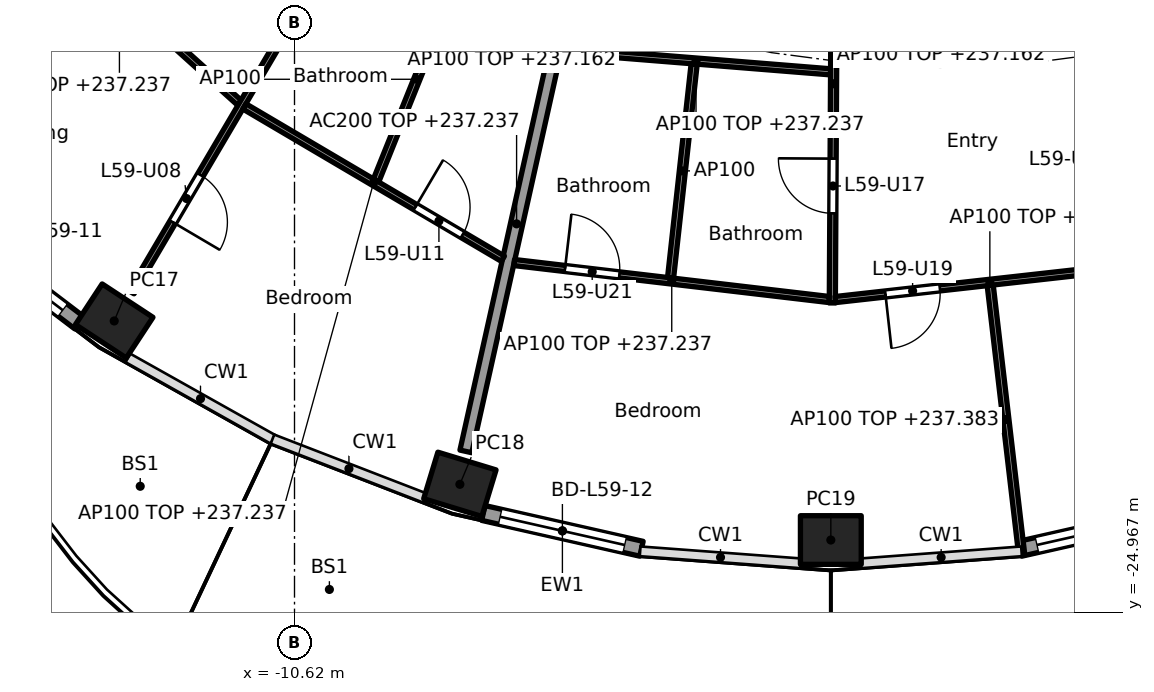
"""IFC4 building model, lengths in metres.
Left out: names, types, materials, properties, quantities, classifications, styles, units other than length and angle.
Written with IfcOpenShell. Run it as: python <this file> out.ifc"""

import sys

from ifc_helpers import new_model, si_unit, direction, frame, frame_2d, origin, origin_2d, place, context, subcontext, project, spatial, rectangle, hollow_rectangle, extrude, element, fill, save


model = new_model("IFC4")
c1 = context("Model", 3, precision=1e-05, world=origin(), true_north=direction((0.0, 1.0)))
c2 = subcontext(c1, "Body", "Model", "MODEL_VIEW")
j1 = project(units=[si_unit("LENGTHUNIT", "METRE"), si_unit("PLANEANGLEUNIT", "RADIAN")], contexts=[c1])
p1 = place(None, origin())
s1 = spatial("IfcSite", under=j1, at=p1, CompositionType="ELEMENT")
p2 = place(p1, origin())
s2 = spatial("IfcBuilding", under=s1, at=p2, CompositionType="ELEMENT")
p3 = place(p2, frame((0.0, 0.0, 234.4)))
s3 = spatial("IfcBuildingStorey", under=s2, at=p3, CompositionType="ELEMENT", Elevation=234.4)
for number, where, z_axis, x_axis in (
    (1, (-13.585, -20.17, 0.0), (0.0, 0.0, 1.0), (0.836, -0.549, 0.0)),
    (2, (-7.9, -22.856, 0.0), (0.0, 0.0, 1.0), (0.957, -0.292, 0.0)),
    (3, (-1.8, -23.772, 0.0), (0.0, 0.0, 1.0), (1.0, 0.0, 0.0)),
):
    element("IfcColumn", number, at=place(p3, frame(where, z_axis=z_axis, x_axis=x_axis)), inside=s3, PredefinedType="COLUMN", context=c2, shape_type="SweptSolid", body=[
        extrude(hollow_rectangle(XDim=1.0, YDim=0.8, WallThickness=0.032, at=origin_2d()), origin(), (0.0, 0.0, 1.0), 3.7),
    ])
p4 = place(p3, frame((-14.157, -20.201, 0.0), z_axis=(0.0, 0.0, 1.0), x_axis=(-0.795990084031, 0.60530966135, 0.0)))
e4 = element("IfcWall", 4, at=p4, inside=s3, PredefinedType="SOLIDWALL", context=c2, shape_type="SweptSolid", body=[
    extrude(rectangle(XDim=2.789, YDim=0.25, at=frame_2d((1.394, 0.0))), origin(), (0.0, 0.0, 1.0), 3.44),
])
p5 = place(p4, frame((0.344, 0.0, 0.0)))
e5 = element("IfcOpeningElement", 5, at=p5, cuts=e4, PredefinedType="OPENING", context=c2, shape_type="SweptSolid", body=[
    extrude(rectangle(XDim=2.1, YDim=2.4, at=frame_2d((1.05, 1.2))), frame((0.0, 0.135, 0.0), z_axis=(0.0, -1.0, 0.0), x_axis=(1.0, 0.0, 0.0)), (0.0, 0.0, 1.0), 0.27),
])
p6 = place(p3, frame((-4.914, -23.916, 0.0), z_axis=(0.0, 0.0, 1.0), x_axis=(-0.975324089124, 0.220777990694, 0.0)))
e6 = element("IfcWall", 6, at=p6, inside=s3, PredefinedType="SOLIDWALL", context=c2, shape_type="SweptSolid", body=[
    extrude(rectangle(XDim=2.666, YDim=0.25, at=frame_2d((1.333, 0.0))), origin(), (0.0, 0.0, 1.0), 3.44),
])
p7 = place(p6, frame((0.283, 0.0, 0.0)))
e7 = element("IfcOpeningElement", 7, at=p7, cuts=e6, PredefinedType="OPENING", context=c2, shape_type="SweptSolid", body=[
    extrude(rectangle(XDim=2.1, YDim=2.4, at=frame_2d((1.05, 1.2))), frame((0.0, 0.135, 0.0), z_axis=(0.0, -1.0, 0.0), x_axis=(1.0, 0.0, 0.0)), (0.0, 0.0, 1.0), 0.27),
])
p8 = place(p3, frame((3.915, -23.327, 0.0), z_axis=(0.0, 0.0, 1.0), x_axis=(-0.975324089124, -0.220777990694, 0.0)))
e8 = element("IfcWall", 8, at=p8, inside=s3, PredefinedType="SOLIDWALL", context=c2, shape_type="SweptSolid", body=[
    extrude(rectangle(XDim=2.666, YDim=0.25, at=frame_2d((1.333, 0.0))), origin(), (0.0, 0.0, 1.0), 3.44),
])
p9 = place(p8, frame((0.283, 0.0, 0.0)))
e9 = element("IfcOpeningElement", 9, at=p9, cuts=e8, PredefinedType="OPENING", context=c2, shape_type="SweptSolid", body=[
    extrude(rectangle(XDim=2.1, YDim=2.4, at=frame_2d((1.05, 1.2))), frame((0.0, 0.135, 0.0), z_axis=(0.0, -1.0, 0.0), x_axis=(1.0, 0.0, 0.0)), (0.0, 0.0, 1.0), 0.27),
])
p10 = place(p3, frame((-6.134, -14.831, 0.0), z_axis=(0.0, 0.0, 1.0), x_axis=(-0.217500172543, -0.976060282433, 0.0)))
e10 = element("IfcWall", 10, at=p10, inside=s3, PredefinedType="PARTITIONING", context=c2, shape_type="SweptSolid", body=[
    extrude(rectangle(XDim=7.668, YDim=0.2, at=frame_2d((3.834, 0.0))), origin(), (0.0, 0.0, 1.0), 2.837),
])
p11 = place(p3, frame((-15.474, -13.019, 0.0), z_axis=(0.0, 0.0, 1.0), x_axis=(0.742348572616, -0.670013878017, 0.0)))
e11 = element("IfcWall", 11, at=p11, inside=s3, PredefinedType="PARTITIONING", context=c2, shape_type="SweptSolid", body=[
    extrude(rectangle(XDim=5.319, YDim=0.1, at=frame_2d((2.66, 0.0))), origin(), (0.0, 0.0, 1.0), 2.837),
])
p12 = place(p11, frame((2.21, 0.0, 0.0)))
e12 = element("IfcOpeningElement", 12, at=p12, cuts=e11, PredefinedType="OPENING", context=c2, shape_type="SweptSolid", body=[
    extrude(rectangle(XDim=0.9, YDim=2.1, at=frame_2d((0.45, 1.05))), frame((0.0, 0.06, 0.0), z_axis=(0.0, -1.0, 0.0), x_axis=(1.0, 0.0, 0.0)), (0.0, 0.0, 1.0), 0.12),
])
p13 = place(p3, frame((-7.709, -10.198, 0.0), z_axis=(0.0, 0.0, 1.0), x_axis=(-0.507355901053, -0.8617366127, 0.0)))
e13 = element("IfcWall", 13, at=p13, inside=s3, PredefinedType="PARTITIONING", context=c2, shape_type="SweptSolid", body=[
    extrude(rectangle(XDim=11.025, YDim=0.1, at=frame_2d((5.512, 0.0))), origin(), (0.0, 0.0, 1.0), 2.762),
])
p14 = place(p13, frame((1.326, 0.0, 0.0)))
e14 = element("IfcOpeningElement", 14, at=p14, cuts=e13, PredefinedType="OPENING", context=c2, shape_type="SweptSolid", body=[
    extrude(rectangle(XDim=0.9, YDim=2.1, at=frame_2d((0.45, 1.05))), frame((0.0, 0.06, 0.0), z_axis=(0.0, -1.0, 0.0), x_axis=(1.0, 0.0, 0.0)), (0.0, 0.0, 1.0), 0.12),
])
p15 = place(p13, frame((5.05, 0.0, 0.0)))
e15 = element("IfcOpeningElement", 15, at=p15, cuts=e13, PredefinedType="OPENING", context=c2, shape_type="SweptSolid", body=[
    extrude(rectangle(XDim=0.9, YDim=2.1, at=frame_2d((0.45, 1.05))), frame((0.0, 0.06, 0.0), z_axis=(0.0, -1.0, 0.0), x_axis=(1.0, 0.0, 0.0)), (0.0, 0.0, 1.0), 0.12),
])
p16 = place(p13, frame((8.787, 0.0, 0.0)))
e16 = element("IfcOpeningElement", 16, at=p16, cuts=e13, PredefinedType="OPENING", context=c2, shape_type="SweptSolid", body=[
    extrude(rectangle(XDim=0.9, YDim=2.1, at=frame_2d((0.45, 1.05))), frame((0.0, 0.06, 0.0), z_axis=(0.0, -1.0, 0.0), x_axis=(1.0, 0.0, 0.0)), (0.0, 0.0, 1.0), 0.12),
])
p17 = place(p3, frame((-11.445, -16.641, 0.0), z_axis=(0.0, 0.0, 1.0), x_axis=(0.861568986754, -0.507640503766, 0.0)))
e17 = element("IfcWall", 17, at=p17, inside=s3, PredefinedType="PARTITIONING", context=c2, shape_type="SweptSolid", body=[
    extrude(rectangle(XDim=4.935, YDim=0.1, at=frame_2d((2.467, 0.0))), origin(), (0.0, 0.0, 1.0), 2.837),
])
p18 = place(p17, frame((3.264, 0.0, 0.0)))
e18 = element("IfcOpeningElement", 18, at=p18, cuts=e17, PredefinedType="OPENING", context=c2, shape_type="SweptSolid", body=[
    extrude(rectangle(XDim=0.9, YDim=2.1, at=frame_2d((0.45, 1.05))), frame((0.0, 0.06, 0.0), z_axis=(0.0, -1.0, 0.0), x_axis=(1.0, 0.0, 0.0)), (0.0, 0.0, 1.0), 0.12),
])
p19 = place(p3, frame((-7.939, -14.531, 0.0), z_axis=(0.0, 0.0, 1.0), x_axis=(-0.373254758443, -0.927728885666, 0.0)))
e19 = element("IfcWall", 19, at=p19, inside=s3, PredefinedType="PARTITIONING", context=c2, shape_type="SweptSolid", body=[
    extrude(rectangle(XDim=3.589, YDim=0.1, at=frame_2d((1.794, 0.0))), origin(), (0.0, 0.0, 1.0), 3.44),
])
p20 = place(p3, frame((-6.23, -15.717, 0.0), z_axis=(0.0, 0.0, 1.0), x_axis=(0.996785662802, -0.080114558181, 0.0)))
e20 = element("IfcWall", 20, at=p20, inside=s3, PredefinedType="PARTITIONING", context=c2, shape_type="SweptSolid", body=[
    extrude(rectangle(XDim=4.44, YDim=0.1, at=frame_2d((2.22, 0.0))), origin(), (0.0, 0.0, 1.0), 2.837),
])
p21 = place(p3, frame((-7.008, -19.209, 0.0), z_axis=(0.0, 0.0, 1.0), x_axis=(0.993174535364, -0.116637653885, 0.0)))
e21 = element("IfcWall", 21, at=p21, inside=s3, PredefinedType="PARTITIONING", context=c2, shape_type="SweptSolid", body=[
    extrude(rectangle(XDim=5.218, YDim=0.1, at=frame_2d((2.609, 0.0))), origin(), (0.0, 0.0, 1.0), 2.837),
])
p22 = place(p21, frame((0.842, 0.0, 0.0)))
e22 = element("IfcOpeningElement", 22, at=p22, cuts=e21, PredefinedType="OPENING", context=c2, shape_type="SweptSolid", body=[
    extrude(rectangle(XDim=0.9, YDim=2.1, at=frame_2d((0.45, 1.05))), frame((0.0, 0.06, 0.0), z_axis=(0.0, -1.0, 0.0), x_axis=(1.0, 0.0, 0.0)), (0.0, 0.0, 1.0), 0.12),
])
p23 = place(p3, frame((-4.047, -15.943, 0.0), z_axis=(0.0, 0.0, 1.0), x_axis=(-0.109681942509, -0.993966735604, 0.0)))
e23 = element("IfcWall", 23, at=p23, inside=s3, PredefinedType="PARTITIONING", context=c2, shape_type="SweptSolid", body=[
    extrude(rectangle(XDim=3.539, YDim=0.1, at=frame_2d((1.77, 0.0))), origin(), (0.0, 0.0, 1.0), 3.44),
])
p24 = place(p3, frame((-1.735, -12.665, 0.0), z_axis=(0.0, 0.0, 1.0), x_axis=(-0.005554152823, -0.999984575574, 0.0)))
e24 = element("IfcWall", 24, at=p24, inside=s3, PredefinedType="PARTITIONING", context=c2, shape_type="SweptSolid", body=[
    extrude(rectangle(XDim=7.209, YDim=0.1, at=frame_2d((3.604, 0.0))), origin(), (0.0, 0.0, 1.0), 2.762),
])
p25 = place(p24, frame((1.256, 0.0, 0.0)))
e25 = element("IfcOpeningElement", 25, at=p25, cuts=e24, PredefinedType="OPENING", context=c2, shape_type="SweptSolid", body=[
    extrude(rectangle(XDim=0.9, YDim=2.1, at=frame_2d((0.45, 1.05))), frame((0.0, 0.06, 0.0), z_axis=(0.0, -1.0, 0.0), x_axis=(1.0, 0.0, 0.0)), (0.0, 0.0, 1.0), 0.12),
])
p26 = place(p24, frame((4.836, 0.0, 0.0)))
e26 = element("IfcOpeningElement", 26, at=p26, cuts=e24, PredefinedType="OPENING", context=c2, shape_type="SweptSolid", body=[
    extrude(rectangle(XDim=0.9, YDim=2.1, at=frame_2d((0.45, 1.05))), frame((0.0, 0.06, 0.0), z_axis=(0.0, -1.0, 0.0), x_axis=(1.0, 0.0, 0.0)), (0.0, 0.0, 1.0), 0.12),
])
p27 = place(p3, frame((-1.726, -19.818, 0.0), z_axis=(0.0, 0.0, 1.0), x_axis=(0.99381893047, 0.111013212902, 0.0)))
e27 = element("IfcWall", 27, at=p27, inside=s3, PredefinedType="PARTITIONING", context=c2, shape_type="SweptSolid", body=[
    extrude(rectangle(XDim=5.113, YDim=0.1, at=frame_2d((2.557, 0.0))), origin(), (0.0, 0.0, 1.0), 2.837),
])
p28 = place(p27, frame((0.828, 0.0, 0.0)))
e28 = element("IfcOpeningElement", 28, at=p28, cuts=e27, PredefinedType="OPENING", context=c2, shape_type="SweptSolid", body=[
    extrude(rectangle(XDim=0.9, YDim=2.1, at=frame_2d((0.45, 1.05))), frame((0.0, 0.06, 0.0), z_axis=(0.0, -1.0, 0.0), x_axis=(1.0, 0.0, 0.0)), (0.0, 0.0, 1.0), 0.12),
])
p29 = place(p3, frame((0.821, -19.584, 0.0), z_axis=(0.0, 0.0, 1.0), x_axis=(0.116120946841, -0.993235080786, 0.0)))
e29 = element("IfcWall", 29, at=p29, inside=s3, PredefinedType="PARTITIONING", context=c2, shape_type="SweptSolid", body=[
    extrude(rectangle(XDim=4.445, YDim=0.1, at=frame_2d((2.222, 0.0))), origin(), (0.0, 0.0, 1.0), 2.983),
])
p30 = place(p3, frame((1.759, -12.662, 0.0), z_axis=(0.0, 0.0, 1.0), x_axis=(0.242653275363, -0.970113079984, 0.0)))
e30 = element("IfcWall", 30, at=p30, inside=s3, PredefinedType="PARTITIONING", context=c2, shape_type="SweptSolid", body=[
    extrude(rectangle(XDim=6.836, YDim=0.1, at=frame_2d((3.418, 0.0))), origin(), (0.0, 0.0, 1.0), 2.762),
])
p31 = place(p30, frame((1.166, 0.0, 0.0)))
e31 = element("IfcOpeningElement", 31, at=p31, cuts=e30, PredefinedType="OPENING", context=c2, shape_type="SweptSolid", body=[
    extrude(rectangle(XDim=0.9, YDim=2.1, at=frame_2d((0.45, 1.05))), frame((0.0, 0.06, 0.0), z_axis=(0.0, -1.0, 0.0), x_axis=(1.0, 0.0, 0.0)), (0.0, 0.0, 1.0), 0.12),
])
p32 = place(p30, frame((4.559, 0.0, 0.0)))
e32 = element("IfcOpeningElement", 32, at=p32, cuts=e30, PredefinedType="OPENING", context=c2, shape_type="SweptSolid", body=[
    extrude(rectangle(XDim=0.9, YDim=2.1, at=frame_2d((0.45, 1.05))), frame((0.0, 0.06, 0.0), z_axis=(0.0, -1.0, 0.0), x_axis=(1.0, 0.0, 0.0)), (0.0, 0.0, 1.0), 0.12),
])
p33 = place(p5, origin())
e33 = element("IfcDoor", 33, at=p33, inside=s3, OperationType="SLIDING_TO_LEFT", PredefinedType="DOOR", context=c2, shape_type="SweptSolid", body=[
    extrude(rectangle(XDim=2.1, YDim=2.4, at=frame_2d((1.05, 1.2))), frame((0.0, 0.025, 0.0), z_axis=(0.0, -1.0, 0.0), x_axis=(1.0, 0.0, 0.0)), (0.0, 0.0, 1.0), 0.05),
])
fill(e5, e33)
p34 = place(p7, origin())
e34 = element("IfcDoor", 34, at=p34, inside=s3, OperationType="SLIDING_TO_LEFT", PredefinedType="DOOR", context=c2, shape_type="SweptSolid", body=[
    extrude(rectangle(XDim=2.1, YDim=2.4, at=frame_2d((1.05, 1.2))), frame((0.0, 0.025, 0.0), z_axis=(0.0, -1.0, 0.0), x_axis=(1.0, 0.0, 0.0)), (0.0, 0.0, 1.0), 0.05),
])
fill(e7, e34)
p35 = place(p9, origin())
e35 = element("IfcDoor", 35, at=p35, inside=s3, OperationType="SLIDING_TO_LEFT", PredefinedType="DOOR", context=c2, shape_type="SweptSolid", body=[
    extrude(rectangle(XDim=2.1, YDim=2.4, at=frame_2d((1.05, 1.2))), frame((0.0, 0.025, 0.0), z_axis=(0.0, -1.0, 0.0), x_axis=(1.0, 0.0, 0.0)), (0.0, 0.0, 1.0), 0.05),
])
fill(e9, e35)
p36 = place(p16, origin())
e36 = element("IfcDoor", 36, at=p36, inside=s3, OperationType="SINGLE_SWING_RIGHT", PredefinedType="DOOR", context=c2, shape_type="SweptSolid", body=[
    extrude(rectangle(XDim=0.9, YDim=2.1, at=frame_2d((0.45, 1.05))), frame((0.0, 0.025, 0.0), z_axis=(0.0, -1.0, 0.0), x_axis=(1.0, 0.0, 0.0)), (0.0, 0.0, 1.0), 0.05),
])
fill(e16, e36)
p37 = place(p18, origin())
e37 = element("IfcDoor", 37, at=p37, inside=s3, OperationType="SINGLE_SWING_LEFT", PredefinedType="DOOR", context=c2, shape_type="SweptSolid", body=[
    extrude(rectangle(XDim=0.9, YDim=2.1, at=frame_2d((0.45, 1.05))), frame((0.0, 0.025, 0.0), z_axis=(0.0, -1.0, 0.0), x_axis=(1.0, 0.0, 0.0)), (0.0, 0.0, 1.0), 0.05),
])
fill(e18, e37)
p38 = place(p26, frame((0.9, 0.0, 0.0), x_axis=(-1.0, 0.0, 0.0)))
e38 = element("IfcDoor", 38, at=p38, inside=s3, OperationType="SINGLE_SWING_RIGHT", PredefinedType="DOOR", context=c2, shape_type="SweptSolid", body=[
    extrude(rectangle(XDim=0.9, YDim=2.1, at=frame_2d((0.45, 1.05))), frame((0.0, 0.025, 0.0), z_axis=(0.0, -1.0, 0.0), x_axis=(1.0, 0.0, 0.0)), (0.0, 0.0, 1.0), 0.05),
])
fill(e26, e38)
p39 = place(p28, frame((0.9, 0.0, 0.0), x_axis=(-1.0, 0.0, 0.0)))
e39 = element("IfcDoor", 39, at=p39, inside=s3, OperationType="SINGLE_SWING_RIGHT", PredefinedType="DOOR", context=c2, shape_type="SweptSolid", body=[
    extrude(rectangle(XDim=0.9, YDim=2.1, at=frame_2d((0.45, 1.05))), frame((0.0, 0.025, 0.0), z_axis=(0.0, -1.0, 0.0), x_axis=(1.0, 0.0, 0.0)), (0.0, 0.0, 1.0), 0.05),
])
fill(e28, e39)
p40 = place(p22, origin())
e40 = element("IfcDoor", 40, at=p40, inside=s3, OperationType="SINGLE_SWING_LEFT", PredefinedType="DOOR", context=c2, shape_type="SweptSolid", body=[
    extrude(rectangle(XDim=0.9, YDim=2.1, at=frame_2d((0.45, 1.05))), frame((0.0, 0.025, 0.0), z_axis=(0.0, -1.0, 0.0), x_axis=(1.0, 0.0, 0.0)), (0.0, 0.0, 1.0), 0.05),
])
fill(e22, e40)
save(model, sys.argv[1])
